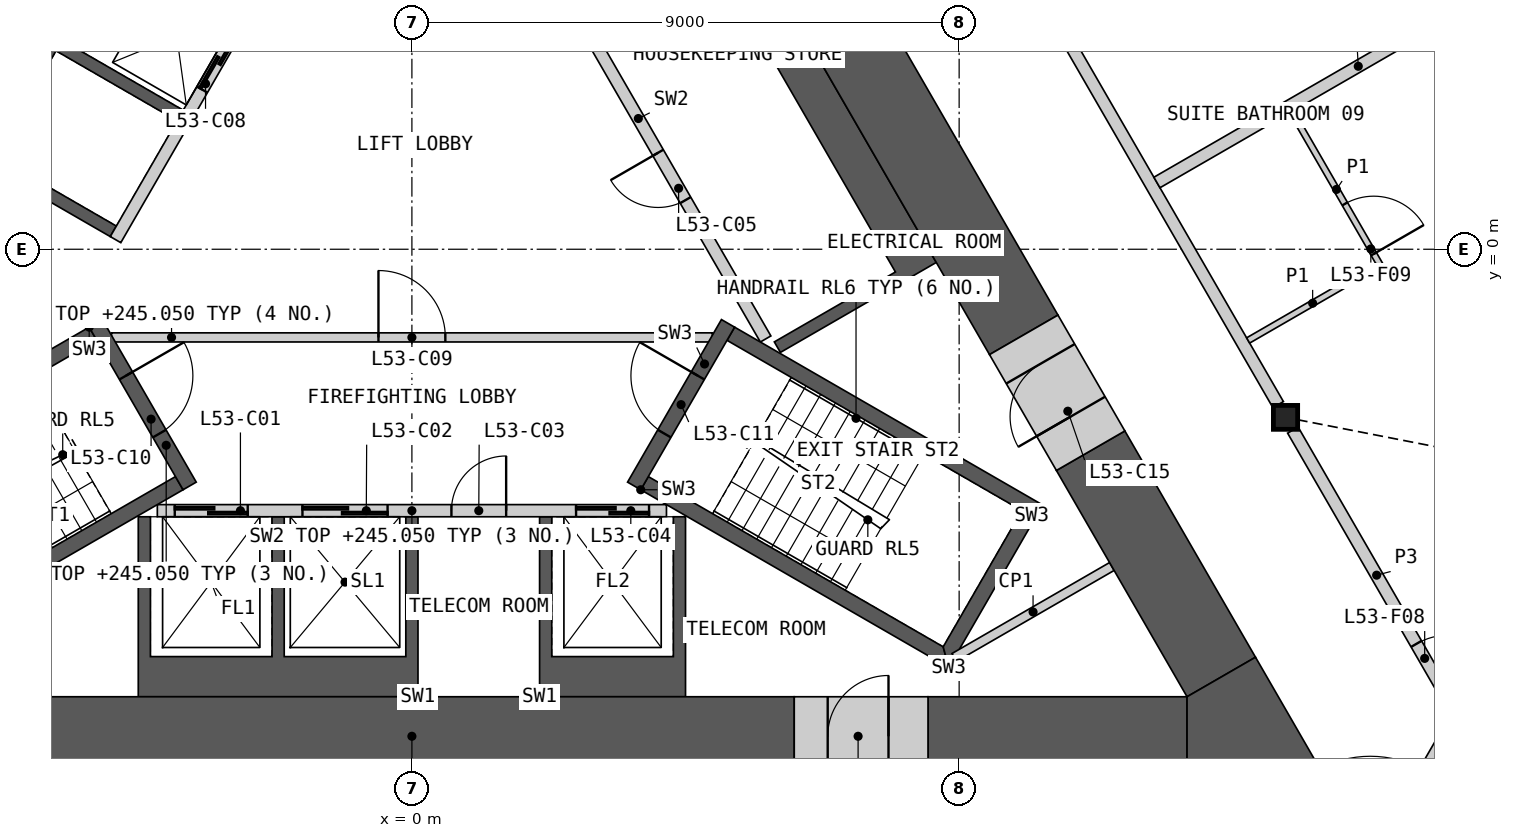
"""IFC4 building model, lengths in metres.
Left out: names, types, materials, properties, quantities, classifications, styles, units other than length and angle.
Written with IfcOpenShell. Run it as: python <this file> out.ifc"""

import sys

from ifc_helpers import new_model, si_unit, direction, frame, frame_2d, origin, origin_2d, place, context, subcontext, project, spatial, polyline, rectangle, i_section, outline, extrude, element, fill, save


model = new_model("IFC4")
c1 = context("Model", 3, precision=1e-05, world=origin(), true_north=direction((0.0, 1.0)))
c2 = subcontext(c1, "Body", "Model", "MODEL_VIEW")
j1 = project(units=[si_unit("LENGTHUNIT", "METRE"), si_unit("PLANEANGLEUNIT", "RADIAN")], contexts=[c1])
p1 = place(None, origin())
s1 = spatial("IfcSite", under=j1, at=p1, CompositionType="ELEMENT")
p2 = place(p1, origin())
s2 = spatial("IfcBuilding", under=s1, at=p2, CompositionType="ELEMENT")
p3 = place(p2, frame((0.0, 0.0, 241.8)))
s3 = spatial("IfcBuildingStorey", under=s2, at=p3, CompositionType="ELEMENT", Elevation=241.8)
p4 = place(p3, frame((14.368, -2.765, 0.0), z_axis=(0.0, 0.0, 1.0), x_axis=(1.0, 0.0, 0.0)))
e1 = element("IfcColumn", 1, at=p4, inside=s3, PredefinedType="COLUMN", context=c2, shape_type="SweptSolid", body=[
    extrude(i_section(OverallWidth=0.399, OverallDepth=0.393, WebThickness=0.023, FlangeThickness=0.037, at=origin_2d()), origin(), (0.0, 0.0, 1.0), 3.6),
])
p5 = place(p3, origin())
e2 = element("IfcWall", 2, at=p5, inside=s3, PredefinedType="SHEAR", context=c2, shape_type="SweptSolid", body=[
    extrude(outline(polyline([(0.1, -7.36), (-4.5, -7.36), (-4.5, -4.4), (-4.3, -4.4), (-4.3, -6.7), (-2.3, -6.7), (-2.3, -4.4), (-2.1, -4.4), (-2.1, -6.7), (-0.1, -6.7), (-0.1, -4.4), (0.1, -4.4), (0.1, -7.36)])), origin(), (0.0, 0.0, 1.0), 3.25),
])
p6 = place(p3, origin())
e3 = element("IfcWall", 3, at=p6, inside=s3, PredefinedType="SHEAR", context=c2, shape_type="SweptSolid", body=[
    extrude(outline(polyline([(2.1, -7.36), (2.1, -4.4), (2.3, -4.4), (2.3, -6.7), (4.3, -6.7), (4.3, -4.4), (4.5, -4.4), (4.5, -7.36), (2.1, -7.36)])), origin(), (0.0, 0.0, 1.0), 3.25),
])
p7 = place(p3, frame((-4.187, -4.3, 0.0), z_axis=(0.0, 0.0, 1.0), x_axis=(1.0, 0.0, 0.0)))
e4 = element("IfcWall", 4, at=p7, inside=s3, PredefinedType="SOLIDWALL", context=c2, shape_type="SweptSolid", body=[
    extrude(rectangle(XDim=8.373, YDim=0.2, at=frame_2d((4.187, 0.0))), origin(), (0.0, 0.0, 1.0), 3.25),
])
p8 = place(p7, frame((0.287, 0.0, 0.0)))
e5 = element("IfcOpeningElement", 5, at=p8, cuts=e4, PredefinedType="OPENING", context=c2, shape_type="SweptSolid", body=[
    extrude(rectangle(XDim=1.2, YDim=2.1, at=frame_2d((0.6, 1.05))), frame((0.0, 0.11, 0.0), z_axis=(0.0, -1.0, 0.0), x_axis=(1.0, 0.0, 0.0)), (0.0, 0.0, 1.0), 0.22),
])
p9 = place(p7, frame((2.387, 0.0, 0.0)))
e6 = element("IfcOpeningElement", 6, at=p9, cuts=e4, PredefinedType="OPENING", context=c2, shape_type="SweptSolid", body=[
    extrude(rectangle(XDim=1.4, YDim=2.1, at=frame_2d((0.7, 1.05))), frame((0.0, 0.11, 0.0), z_axis=(0.0, -1.0, 0.0), x_axis=(1.0, 0.0, 0.0)), (0.0, 0.0, 1.0), 0.22),
])
p10 = place(p7, frame((4.837, 0.0, 0.0)))
e7 = element("IfcOpeningElement", 7, at=p10, cuts=e4, PredefinedType="OPENING", context=c2, shape_type="SweptSolid", body=[
    extrude(rectangle(XDim=0.9, YDim=2.1, at=frame_2d((0.45, 1.05))), frame((0.0, 0.11, 0.0), z_axis=(0.0, -1.0, 0.0), x_axis=(1.0, 0.0, 0.0)), (0.0, 0.0, 1.0), 0.22),
])
p11 = place(p7, frame((6.887, 0.0, 0.0)))
e8 = element("IfcOpeningElement", 8, at=p11, cuts=e4, PredefinedType="OPENING", context=c2, shape_type="SweptSolid", body=[
    extrude(rectangle(XDim=1.2, YDim=2.1, at=frame_2d((0.6, 1.05))), frame((0.0, 0.11, 0.0), z_axis=(0.0, -1.0, 0.0), x_axis=(1.0, 0.0, 0.0)), (0.0, 0.0, 1.0), 0.22),
])
p12 = place(p3, origin())
e9 = element("IfcWall", 9, at=p12, inside=s3, PredefinedType="SHEAR", context=c2, shape_type="SweptSolid", body=[
    extrude(outline(polyline([(4.124, 7.577), (8.624, -0.217), (8.231, -0.444), (6.061, -1.697), (5.96, -1.524), (7.952, -0.374), (4.752, 5.169), (2.76, 4.019), (2.66, 4.192), (4.652, 5.342), (3.652, 7.074), (1.66, 5.924), (1.561, 6.097), (3.731, 7.35), (4.124, 7.577)])), origin(), (0.0, 0.0, 1.0), 3.25),
])
p13 = place(p3, frame((5.817, -1.476, 0.0), z_axis=(0.0, 0.0, 1.0), x_axis=(-0.500002616675, 0.866023893041, 0.0)))
e10 = element("IfcWall", 10, at=p13, inside=s3, PredefinedType="SOLIDWALL", context=c2, shape_type="SweptSolid", body=[
    extrude(rectangle(XDim=8.373, YDim=0.2, at=frame_2d((4.187, 0.0))), origin(), (0.0, 0.0, 1.0), 3.25),
])
p14 = place(p13, frame((2.637, 0.0, 0.0)))
e11 = element("IfcOpeningElement", 11, at=p14, cuts=e10, PredefinedType="OPENING", context=c2, shape_type="SweptSolid", body=[
    extrude(rectangle(XDim=0.9, YDim=2.1, at=frame_2d((0.45, 1.05))), frame((0.0, 0.11, 0.0), z_axis=(0.0, -1.0, 0.0), x_axis=(1.0, 0.0, 0.0)), (0.0, 0.0, 1.0), 0.22),
])
p15 = place(p13, frame((6.937, 0.0, 0.0)))
e12 = element("IfcOpeningElement", 12, at=p15, cuts=e10, PredefinedType="OPENING", context=c2, shape_type="SweptSolid", body=[
    extrude(rectangle(XDim=1.1, YDim=2.1, at=frame_2d((0.55, 1.05))), frame((0.0, 0.11, 0.0), z_axis=(0.0, -1.0, 0.0), x_axis=(1.0, 0.0, 0.0)), (0.0, 0.0, 1.0), 0.22),
])
p16 = place(p3, origin())
e13 = element("IfcWall", 13, at=p16, inside=s3, PredefinedType="SHEAR", context=c2, shape_type="SweptSolid", body=[
    extrude(outline(polyline([(-7.524, 1.688), (-4.124, 7.577), (-3.731, 7.35), (-1.561, 6.097), (-1.66, 5.924), (-3.652, 7.074), (-4.652, 5.342), (-2.66, 4.192), (-2.76, 4.019), (-4.752, 5.169), (-5.752, 3.437), (-3.76, 2.287), (-3.861, 2.113), (-5.852, 3.263), (-6.852, 1.531), (-4.861, 0.381), (-4.96, 0.208), (-7.131, 1.461), (-7.524, 1.688)])), origin(), (0.0, 0.0, 1.0), 3.25),
])
p17 = place(p3, frame((-1.631, 5.776, 0.0), z_axis=(0.0, 0.0, 1.0), x_axis=(-0.499992876559, -0.866029516466, 0.0)))
e14 = element("IfcWall", 14, at=p17, inside=s3, PredefinedType="SOLIDWALL", context=c2, shape_type="SweptSolid", body=[
    extrude(rectangle(XDim=6.486, YDim=0.2, at=frame_2d((3.243, 0.0))), origin(), (0.0, 0.0, 1.0), 3.25),
])
p18 = place(p17, frame((0.337, 0.0, 0.0)))
e15 = element("IfcOpeningElement", 15, at=p18, cuts=e14, PredefinedType="OPENING", context=c2, shape_type="SweptSolid", body=[
    extrude(rectangle(XDim=1.1, YDim=2.1, at=frame_2d((0.55, 1.05))), frame((0.0, 0.11, 0.0), z_axis=(0.0, -1.0, 0.0), x_axis=(1.0, 0.0, 0.0)), (0.0, 0.0, 1.0), 0.22),
])
p19 = place(p17, frame((2.537, 0.0, 0.0)))
e16 = element("IfcOpeningElement", 16, at=p19, cuts=e14, PredefinedType="OPENING", context=c2, shape_type="SweptSolid", body=[
    extrude(rectangle(XDim=1.1, YDim=2.1, at=frame_2d((0.55, 1.05))), frame((0.0, 0.11, 0.0), z_axis=(0.0, -1.0, 0.0), x_axis=(1.0, 0.0, 0.0)), (0.0, 0.0, 1.0), 0.22),
])
p20 = place(p3, frame((-4.941, -1.45, 0.0), z_axis=(0.0, 0.0, 1.0), x_axis=(1.0, 0.0, 0.0)))
e17 = element("IfcWall", 17, at=p20, inside=s3, PredefinedType="PARTITIONING", context=c2, shape_type="SweptSolid", body=[
    extrude(rectangle(XDim=9.882, YDim=0.15, at=frame_2d((4.941, 0.0))), origin(), (0.0, 0.0, 1.0), 3.25),
])
p21 = place(p20, frame((4.391, 0.0, 0.0)))
e18 = element("IfcOpeningElement", 18, at=p21, cuts=e17, PredefinedType="OPENING", context=c2, shape_type="SweptSolid", body=[
    extrude(rectangle(XDim=1.1, YDim=2.1, at=frame_2d((0.55, 1.05))), frame((0.0, 0.085, 0.0), z_axis=(0.0, -1.0, 0.0), x_axis=(1.0, 0.0, 0.0)), (0.0, 0.0, 1.0), 0.17),
])
p22 = place(p3, origin())
e19 = element("IfcWall", 19, at=p22, inside=s3, PredefinedType="SHEAR", context=c2, shape_type="SweptSolid", body=[
    extrude(outline(polyline([(-5.307, -1.281), (-10.374, -4.206), (-10.032, -4.298), (-5.182, -1.498), (-5.307, -1.281)])), origin(), (0.0, 0.0, 1.0), 3.25),
])
p23 = place(p3, origin())
e20 = element("IfcWall", 20, at=p23, inside=s3, PredefinedType="SHEAR", context=c2, shape_type="SweptSolid", body=[
    extrude(outline(polyline([(-8.738, -6.539), (-8.83, -6.881), (-3.763, -3.956), (-3.888, -3.739), (-8.738, -6.539)])), origin(), (0.0, 0.0, 1.0), 3.25),
])
p24 = place(p3, frame((-5.199, -1.219, 0.0), z_axis=(0.0, 0.0, 1.0), x_axis=(0.499982516597, -0.866035497597, 0.0)))
e21 = element("IfcWall", 21, at=p24, inside=s3, PredefinedType="SHEAR", context=c2, shape_type="SweptSolid", body=[
    extrude(rectangle(XDim=3.088, YDim=0.25, at=frame_2d((1.544, 0.0))), origin(), (0.0, 0.0, 1.0), 3.25),
])
p25 = place(p24, frame((0.994, 0.0, 0.0)))
e22 = element("IfcOpeningElement", 22, at=p25, cuts=e21, PredefinedType="OPENING", context=c2, shape_type="SweptSolid", body=[
    extrude(rectangle(XDim=1.1, YDim=2.1, at=frame_2d((0.55, 1.05))), frame((0.0, 0.135, 0.0), z_axis=(0.0, -1.0, 0.0), x_axis=(1.0, 0.0, 0.0)), (0.0, 0.0, 1.0), 0.27),
])
p26 = place(p3, origin())
e23 = element("IfcWall", 23, at=p26, inside=s3, PredefinedType="SHEAR", context=c2, shape_type="SweptSolid", body=[
    extrude(outline(polyline([(3.763, -3.956), (8.83, -6.881), (8.738, -6.539), (3.888, -3.739), (3.763, -3.956)])), origin(), (0.0, 0.0, 1.0), 3.25),
])
p27 = place(p3, origin())
e24 = element("IfcWall", 24, at=p27, inside=s3, PredefinedType="SHEAR", context=c2, shape_type="SweptSolid", body=[
    extrude(outline(polyline([(8.83, -6.881), (10.374, -4.206), (10.032, -4.298), (8.738, -6.539), (8.83, -6.881)])), origin(), (0.0, 0.0, 1.0), 3.25),
])
p28 = place(p3, origin())
e25 = element("IfcWall", 25, at=p28, inside=s3, PredefinedType="SHEAR", context=c2, shape_type="SweptSolid", body=[
    extrude(outline(polyline([(10.032, -4.298), (10.374, -4.206), (5.307, -1.281), (5.182, -1.498), (10.032, -4.298)])), origin(), (0.0, 0.0, 1.0), 3.25),
])
p29 = place(p3, frame((3.655, -3.893, 0.0), z_axis=(0.0, 0.0, 1.0), x_axis=(0.499982516597, 0.866035497597, 0.0)))
e26 = element("IfcWall", 26, at=p29, inside=s3, PredefinedType="SHEAR", context=c2, shape_type="SweptSolid", body=[
    extrude(rectangle(XDim=3.088, YDim=0.25, at=frame_2d((1.544, 0.0))), origin(), (0.0, 0.0, 1.0), 3.25),
])
p30 = place(p29, frame((0.994, 0.0, 0.0)))
e27 = element("IfcOpeningElement", 27, at=p30, cuts=e26, PredefinedType="OPENING", context=c2, shape_type="SweptSolid", body=[
    extrude(rectangle(XDim=1.1, YDim=2.1, at=frame_2d((0.55, 1.05))), frame((0.0, 0.135, 0.0), z_axis=(0.0, -1.0, 0.0), x_axis=(1.0, 0.0, 0.0)), (0.0, 0.0, 1.0), 0.27),
])
p31 = place(p3, frame((11.511, -5.218, 0.0), z_axis=(0.0, 0.0, 1.0), x_axis=(-0.866045649925, -0.499964931016, 0.0)))
e28 = element("IfcWall", 28, at=p31, inside=s3, PredefinedType="PARTITIONING", context=c2, shape_type="SweptSolid", body=[
    extrude(rectangle(XDim=2.992, YDim=0.15, at=frame_2d((1.496, 0.0))), origin(), (0.0, 0.0, 1.0), 3.25),
])
p32 = place(p3, frame((-6.288, -8.01, 0.0), z_axis=(0.0, 0.0, 1.0), x_axis=(1.0, 0.0, 0.0)))
e29 = element("IfcWall", 29, at=p32, inside=s3, PredefinedType="SHEAR", context=c2, shape_type="SweptSolid", body=[
    extrude(rectangle(XDim=12.576, YDim=1.3, at=frame_2d((6.288, 0.0))), origin(), (0.0, 0.0, 1.0), 3.25),
])
p33 = place(p3, frame((8.488, -8.01, 0.0), z_axis=(0.0, 0.0, 1.0), x_axis=(1.0, 0.0, 0.0)))
e30 = element("IfcWall", 30, at=p33, inside=s3, PredefinedType="SHEAR", context=c2, shape_type="SweptSolid", body=[
    extrude(rectangle(XDim=4.26, YDim=1.3, at=frame_2d((2.13, 0.0))), origin(), (0.0, 0.0, 1.0), 3.25),
])
p34 = place(p3, frame((10.062, -1.408, 0.0), z_axis=(0.0, 0.0, 1.0), x_axis=(-0.500000545805, 0.866025088663, 0.0)))
e31 = element("IfcWall", 31, at=p34, inside=s3, PredefinedType="SHEAR", context=c2, shape_type="SweptSolid", body=[
    extrude(rectangle(XDim=12.539, YDim=1.3, at=frame_2d((6.27, 0.0))), origin(), (0.0, 0.0, 1.0), 3.25),
])
p35 = place(p3, frame((13.311, -7.035, 0.0), z_axis=(0.0, 0.0, 1.0), x_axis=(-0.500012574659, 0.86601814368, 0.0)))
e32 = element("IfcWall", 32, at=p35, inside=s3, PredefinedType="SHEAR", context=c2, shape_type="SweptSolid", body=[
    extrude(rectangle(XDim=4.298, YDim=1.3, at=frame_2d((2.149, 0.0))), origin(), (0.0, 0.0, 1.0), 3.25),
])
p36 = place(p3, frame((-3.812, 9.418, 0.0), z_axis=(0.0, 0.0, 1.0), x_axis=(-0.499995037753, -0.86602826872, 0.0)))
e33 = element("IfcWall", 33, at=p36, inside=s3, PredefinedType="SHEAR", context=c2, shape_type="SweptSolid", body=[
    extrude(rectangle(XDim=8.451, YDim=1.3, at=frame_2d((4.225, 0.0))), origin(), (0.0, 0.0, 1.0), 3.25),
])
p37 = place(p3, origin())
e34 = element("IfcWall", 34, at=p37, inside=s3, PredefinedType="SHEAR", context=c2, shape_type="SweptSolid", body=[
    extrude(outline(polyline([(12.748, -8.66), (12.748, -7.36), (13.874, -6.71), (15.0, -8.66), (12.748, -8.66)])), origin(), (0.0, 0.0, 1.0), 3.25),
])
p38 = place(p3, frame((6.288, -8.01, 0.0), z_axis=(0.0, 0.0, 1.0), x_axis=(1.0, 0.0, 0.0)))
e35 = element("IfcWall", 35, at=p38, inside=s3, PredefinedType="SHEAR", context=c2, shape_type="SweptSolid", body=[
    extrude(rectangle(XDim=2.2, YDim=1.3, at=frame_2d((1.1, 0.0))), origin(), (0.0, 0.0, 1.0), 3.25),
])
p39 = place(p38, frame((0.55, 0.0, 0.0)))
e36 = element("IfcOpeningElement", 36, at=p39, cuts=e35, PredefinedType="OPENING", context=c2, shape_type="SweptSolid", body=[
    extrude(rectangle(XDim=1.0, YDim=2.1, at=frame_2d((0.5, 1.05))), frame((0.0, 0.66, 0.0), z_axis=(0.0, -1.0, 0.0), x_axis=(1.0, 0.0, 0.0)), (0.0, 0.0, 1.0), 1.32),
])
p40 = place(p3, frame((11.163, -3.313, 0.0), z_axis=(0.0, 0.0, 1.0), x_axis=(-0.50002983664, 0.866008176907, 0.0)))
e37 = element("IfcWall", 37, at=p40, inside=s3, PredefinedType="SHEAR", context=c2, shape_type="SweptSolid", body=[
    extrude(rectangle(XDim=2.2, YDim=1.3, at=frame_2d((1.1, 0.0))), origin(), (0.0, 0.0, 1.0), 3.25),
])
p41 = place(p40, frame((0.65, 0.0, 0.0)))
e38 = element("IfcOpeningElement", 38, at=p41, cuts=e37, PredefinedType="OPENING", context=c2, shape_type="SweptSolid", body=[
    extrude(rectangle(XDim=1.0, YDim=2.1, at=frame_2d((0.5, 1.05))), frame((0.0, 0.66, 0.0), z_axis=(0.0, -1.0, 0.0), x_axis=(1.0, 0.0, 0.0)), (0.0, 0.0, 1.0), 1.32),
])
p42 = place(p3, frame((9.699, 5.321, 0.0), z_axis=(0.0, 0.0, 1.0), x_axis=(0.49998193945, -0.866035830797, 0.0)))
e39 = element("IfcWall", 39, at=p42, inside=s3, PredefinedType="PARTITIONING", context=c2, shape_type="SweptSolid", body=[
    extrude(rectangle(XDim=9.094, YDim=0.2, at=frame_2d((4.547, 0.0))), origin(), (0.0, 0.0, 1.0), 3.25),
])
p43 = place(p3, frame((14.489, -2.975, 0.0), z_axis=(0.0, 0.0, 1.0), x_axis=(0.500017753321, -0.866015153657, 0.0)))
e40 = element("IfcWall", 40, at=p43, inside=s3, PredefinedType="PARTITIONING", context=c2, shape_type="SweptSolid", body=[
    extrude(rectangle(XDim=5.51, YDim=0.2, at=frame_2d((2.755, 0.0))), origin(), (0.0, 0.0, 1.0), 3.25),
])
p44 = place(p43, frame((4.06, 0.0, 0.0)))
e41 = element("IfcOpeningElement", 41, at=p44, cuts=e40, PredefinedType="OPENING", context=c2, shape_type="SweptSolid", body=[
    extrude(rectangle(XDim=1.1, YDim=2.1, at=frame_2d((0.55, 1.05))), frame((0.0, 0.11, 0.0), z_axis=(0.0, -1.0, 0.0), x_axis=(1.0, 0.0, 0.0)), (0.0, 0.0, 1.0), 0.22),
])
p45 = place(p3, frame((15.231, -11.06, 0.0), z_axis=(0.0, 0.0, 1.0), x_axis=(0.499961815444, 0.866047448526, 0.0)))
e42 = element("IfcWall", 42, at=p45, inside=s3, PredefinedType="PARTITIONING", context=c2, shape_type="SweptSolid", body=[
    extrude(rectangle(XDim=3.826, YDim=0.2, at=frame_2d((1.913, 0.0))), origin(), (0.0, 0.0, 1.0), 3.25),
])
p46 = place(p45, frame((1.064, 0.0, 0.0)))
e43 = element("IfcOpeningElement", 43, at=p46, cuts=e42, PredefinedType="OPENING", context=c2, shape_type="SweptSolid", body=[
    extrude(rectangle(XDim=1.8, YDim=2.1, at=frame_2d((0.9, 1.05))), frame((0.0, 0.11, 0.0), z_axis=(0.0, -1.0, 0.0), x_axis=(1.0, 0.0, 0.0)), (0.0, 0.0, 1.0), 0.22),
])
p47 = place(p3, frame((12.253, 1.098, 0.0), z_axis=(0.0, 0.0, 1.0), x_axis=(0.866026077102, 0.499998833779, 0.0)))
e44 = element("IfcWall", 44, at=p47, inside=s3, PredefinedType="PARTITIONING", context=c2, shape_type="SweptSolid", body=[
    extrude(rectangle(XDim=7.646, YDim=0.2, at=frame_2d((3.823, 0.0))), origin(), (0.0, 0.0, 1.0), 2.404),
])
p48 = place(p3, frame((14.468, 2.261, 0.0), z_axis=(0.0, 0.0, 1.0), x_axis=(0.500037662692, -0.866003658127, 0.0)))
e45 = element("IfcWall", 45, at=p48, inside=s3, PredefinedType="PARTITIONING", context=c2, shape_type="SweptSolid", body=[
    extrude(rectangle(XDim=2.95, YDim=0.1, at=frame_2d((1.475, 0.0))), origin(), (0.0, 0.0, 1.0), 2.404),
])
p49 = place(p48, frame((1.75, 0.0, 0.0)))
e46 = element("IfcOpeningElement", 46, at=p49, cuts=e45, PredefinedType="OPENING", context=c2, shape_type="SweptSolid", body=[
    extrude(rectangle(XDim=0.95, YDim=2.1, at=frame_2d((0.475, 1.05))), frame((0.0, 0.06, 0.0), z_axis=(0.0, -1.0, 0.0), x_axis=(1.0, 0.0, 0.0)), (0.0, 0.0, 1.0), 0.12),
])
p50 = place(p3, frame((13.753, -1.5, 0.0), z_axis=(0.0, 0.0, 1.0), x_axis=(0.866014668023, 0.500018594424, 0.0)))
e47 = element("IfcWall", 47, at=p50, inside=s3, PredefinedType="PARTITIONING", context=c2, shape_type="SweptSolid", body=[
    extrude(rectangle(XDim=2.45, YDim=0.1, at=frame_2d((1.225, 0.0))), origin(), (0.0, 0.0, 1.0), 2.404),
])
p51 = place(p8, origin())
e48 = element("IfcDoor", 48, at=p51, inside=s3, OperationType="SLIDING_TO_LEFT", PredefinedType="DOOR", context=c2, shape_type="SweptSolid", body=[
    extrude(rectangle(XDim=1.2, YDim=2.1, at=frame_2d((0.6, 1.05))), frame((0.0, 0.025, 0.0), z_axis=(0.0, -1.0, 0.0), x_axis=(1.0, 0.0, 0.0)), (0.0, 0.0, 1.0), 0.05),
])
fill(e5, e48)
p52 = place(p9, origin())
e49 = element("IfcDoor", 49, at=p52, inside=s3, OperationType="SLIDING_TO_LEFT", PredefinedType="DOOR", context=c2, shape_type="SweptSolid", body=[
    extrude(rectangle(XDim=1.4, YDim=2.1, at=frame_2d((0.7, 1.05))), frame((0.0, 0.025, 0.0), z_axis=(0.0, -1.0, 0.0), x_axis=(1.0, 0.0, 0.0)), (0.0, 0.0, 1.0), 0.05),
])
fill(e6, e49)
p53 = place(p10, origin())
e50 = element("IfcDoor", 50, at=p53, inside=s3, OperationType="SINGLE_SWING_RIGHT", PredefinedType="DOOR", context=c2, shape_type="SweptSolid", body=[
    extrude(rectangle(XDim=0.9, YDim=2.1, at=frame_2d((0.45, 1.05))), frame((0.0, 0.025, 0.0), z_axis=(0.0, -1.0, 0.0), x_axis=(1.0, 0.0, 0.0)), (0.0, 0.0, 1.0), 0.05),
])
fill(e7, e50)
p54 = place(p11, origin())
e51 = element("IfcDoor", 51, at=p54, inside=s3, OperationType="SLIDING_TO_LEFT", PredefinedType="DOOR", context=c2, shape_type="SweptSolid", body=[
    extrude(rectangle(XDim=1.2, YDim=2.1, at=frame_2d((0.6, 1.05))), frame((0.0, 0.025, 0.0), z_axis=(0.0, -1.0, 0.0), x_axis=(1.0, 0.0, 0.0)), (0.0, 0.0, 1.0), 0.05),
])
fill(e8, e51)
p55 = place(p14, origin())
e52 = element("IfcDoor", 52, at=p55, inside=s3, OperationType="SINGLE_SWING_RIGHT", PredefinedType="DOOR", context=c2, shape_type="SweptSolid", body=[
    extrude(rectangle(XDim=0.9, YDim=2.1, at=frame_2d((0.45, 1.05))), frame((0.0, 0.025, 0.0), z_axis=(0.0, -1.0, 0.0), x_axis=(1.0, 0.0, 0.0)), (0.0, 0.0, 1.0), 0.05),
])
fill(e11, e52)
p56 = place(p19, origin())
e53 = element("IfcDoor", 53, at=p56, inside=s3, OperationType="SLIDING_TO_LEFT", PredefinedType="DOOR", context=c2, shape_type="SweptSolid", body=[
    extrude(rectangle(XDim=1.1, YDim=2.1, at=frame_2d((0.55, 1.05))), frame((0.0, 0.025, 0.0), z_axis=(0.0, -1.0, 0.0), x_axis=(1.0, 0.0, 0.0)), (0.0, 0.0, 1.0), 0.05),
])
fill(e16, e53)
p57 = place(p21, origin())
e54 = element("IfcDoor", 54, at=p57, inside=s3, OperationType="SINGLE_SWING_LEFT", PredefinedType="DOOR", context=c2, shape_type="SweptSolid", body=[
    extrude(rectangle(XDim=1.1, YDim=2.1, at=frame_2d((0.55, 1.05))), frame((0.0, 0.025, 0.0), z_axis=(0.0, -1.0, 0.0), x_axis=(1.0, 0.0, 0.0)), (0.0, 0.0, 1.0), 0.05),
])
fill(e18, e54)
p58 = place(p25, origin())
e55 = element("IfcDoor", 55, at=p58, inside=s3, OperationType="SINGLE_SWING_LEFT", PredefinedType="DOOR", context=c2, shape_type="SweptSolid", body=[
    extrude(rectangle(XDim=1.1, YDim=2.1, at=frame_2d((0.55, 1.05))), frame((0.0, 0.025, 0.0), z_axis=(0.0, -1.0, 0.0), x_axis=(1.0, 0.0, 0.0)), (0.0, 0.0, 1.0), 0.05),
])
fill(e22, e55)
p59 = place(p30, origin())
e56 = element("IfcDoor", 56, at=p59, inside=s3, OperationType="SINGLE_SWING_RIGHT", PredefinedType="DOOR", context=c2, shape_type="SweptSolid", body=[
    extrude(rectangle(XDim=1.1, YDim=2.1, at=frame_2d((0.55, 1.05))), frame((0.0, 0.025, 0.0), z_axis=(0.0, -1.0, 0.0), x_axis=(1.0, 0.0, 0.0)), (0.0, 0.0, 1.0), 0.05),
])
fill(e27, e56)
p60 = place(p39, origin())
e57 = element("IfcDoor", 57, at=p60, inside=s3, OperationType="SINGLE_SWING_RIGHT", PredefinedType="DOOR", context=c2, shape_type="SweptSolid", body=[
    extrude(rectangle(XDim=1.0, YDim=2.1, at=frame_2d((0.5, 1.05))), frame((0.0, 0.405, 0.0), z_axis=(0.0, -1.0, 0.0), x_axis=(1.0, 0.0, 0.0)), (0.0, 0.0, 1.0), 0.05),
])
fill(e36, e57)
p61 = place(p41, origin())
e58 = element("IfcDoor", 58, at=p61, inside=s3, OperationType="SINGLE_SWING_LEFT", PredefinedType="DOOR", context=c2, shape_type="SweptSolid", body=[
    extrude(rectangle(XDim=1.0, YDim=2.1, at=frame_2d((0.5, 1.05))), frame((0.0, 0.405, 0.0), z_axis=(0.0, -1.0, 0.0), x_axis=(1.0, 0.0, 0.0)), (0.0, 0.0, 1.0), 0.05),
])
fill(e38, e58)
p62 = place(p44, origin())
e59 = element("IfcDoor", 59, at=p62, inside=s3, OperationType="SINGLE_SWING_RIGHT", PredefinedType="DOOR", context=c2, shape_type="SweptSolid", body=[
    extrude(rectangle(XDim=1.1, YDim=2.1, at=frame_2d((0.55, 1.05))), frame((0.0, 0.025, 0.0), z_axis=(0.0, -1.0, 0.0), x_axis=(1.0, 0.0, 0.0)), (0.0, 0.0, 1.0), 0.05),
])
fill(e41, e59)
p63 = place(p49, origin())
e60 = element("IfcDoor", 60, at=p63, inside=s3, OperationType="SINGLE_SWING_RIGHT", PredefinedType="DOOR", context=c2, shape_type="SweptSolid", body=[
    extrude(rectangle(XDim=0.95, YDim=2.1, at=frame_2d((0.475, 1.05))), frame((0.0, 0.025, 0.0), z_axis=(0.0, -1.0, 0.0), x_axis=(1.0, 0.0, 0.0)), (0.0, 0.0, 1.0), 0.05),
])
fill(e46, e60)
save(model, sys.argv[1])
